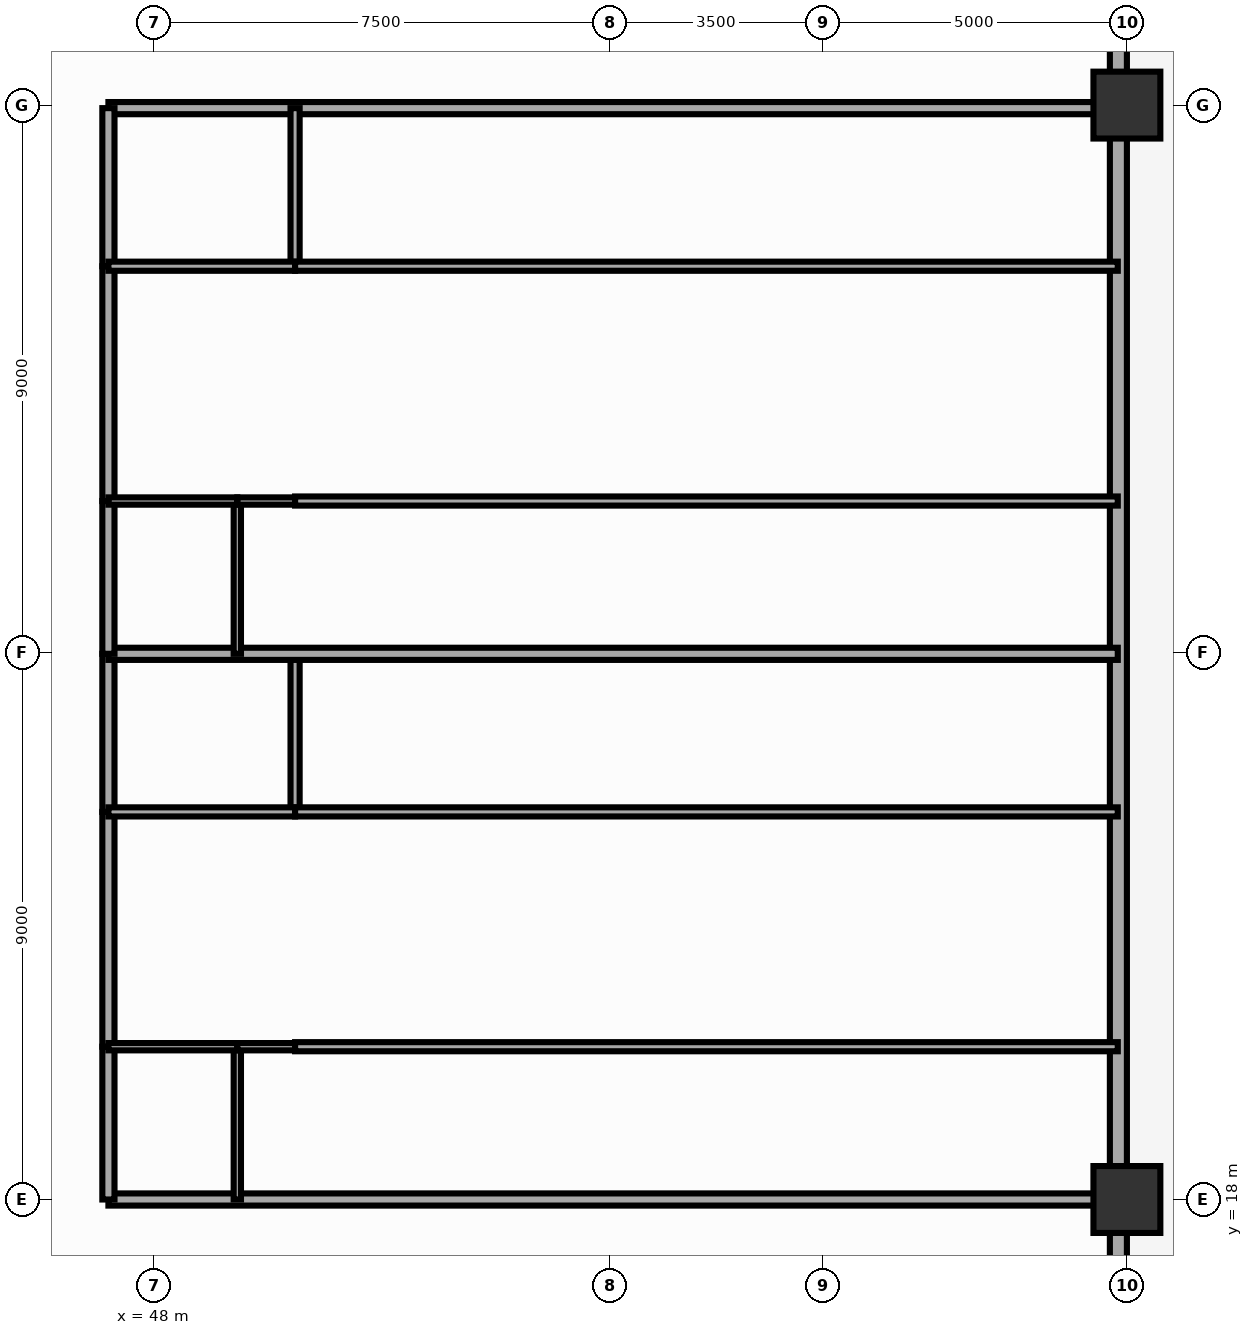
"""IFC4 building model, lengths in metres.
Left out: names, types, materials, properties, quantities, classifications, styles, units other than length and angle.
Written with IfcOpenShell. Run it as: python <this file> out.ifc"""

import sys

from ifc_helpers import new_model, si_unit, direction, frame, frame_2d, origin, origin_2d, place, context, subcontext, project, spatial, rectangle, extrude, source, transform, mapped, element, fill, save


model = new_model("IFC4")
c1 = context("Model", 3, precision=1e-05, world=origin(), true_north=direction((0.0, 1.0)))
c2 = subcontext(c1, "Body", "Model", "MODEL_VIEW")
j1 = project(units=[si_unit("LENGTHUNIT", "METRE"), si_unit("PLANEANGLEUNIT", "RADIAN")], contexts=[c1])
p1 = place(None, origin())
s1 = spatial("IfcSite", under=j1, at=p1, CompositionType="ELEMENT")
p2 = place(p1, origin())
s2 = spatial("IfcBuilding", under=s1, at=p2, CompositionType="ELEMENT")
p3 = place(p2, frame((0.0, 0.0, 19.4)))
s3 = spatial("IfcBuildingStorey", under=s2, at=p3, CompositionType="ELEMENT", Elevation=19.4)
m1 = source(origin(), c2, "Body", "SweptSolid", [
    extrude(rectangle(XDim=1.1, YDim=1.1, at=origin_2d()), origin(), (0.0, 0.0, 1.0), 3.0),
])
for number, where, z_axis, x_axis in (
    (1, (64.0, 18.0, 0.0), (0.0, 0.0, 1.0), (1.0, 0.0, 0.0)),
    (2, (64.0, 36.0, 0.0), (0.0, 0.0, 1.0), (1.0, 0.0, 0.0)),
):
    element("IfcColumn", number, at=place(p3, frame(where, z_axis=z_axis, x_axis=x_axis)), inside=s3, PredefinedType="COLUMN", context=c2, shape_type="MappedRepresentation", body=[
        mapped(m1, transform((0.0, 0.0, 0.0), scale=1.0)),
    ])
p4 = place(p3, frame((63.86, 6.5, 0.0), z_axis=(0.0, 0.0, 1.0), x_axis=(0.0, 1.0, 0.0)))
e3 = element("IfcWall", 3, at=p4, inside=s3, PredefinedType="SOLIDWALL", context=c2, shape_type="SweptSolid", body=[
    extrude(rectangle(XDim=41.0, YDim=0.28, at=frame_2d((20.5, 0.0))), origin(), (0.0, 0.0, 1.0), 2.28),
])
p5 = place(p4, frame((5.15, 0.0, 0.25)))
e4 = element("IfcOpeningElement", 4, at=p5, cuts=e3, PredefinedType="OPENING", context=c2, shape_type="SweptSolid", body=[
    extrude(rectangle(XDim=1.2, YDim=1.5, at=frame_2d((0.6, 0.75))), frame((0.0, 0.152, 0.0), z_axis=(0.0, -1.0, 0.0), x_axis=(1.0, 0.0, 0.0)), (0.0, 0.0, 1.0), 0.304),
])
p6 = place(p4, frame((12.352, 0.0, 0.25)))
e5 = element("IfcOpeningElement", 5, at=p6, cuts=e3, PredefinedType="OPENING", context=c2, shape_type="SweptSolid", body=[
    extrude(rectangle(XDim=1.2, YDim=1.5, at=frame_2d((0.6, 0.75))), frame((0.0, 0.152, 0.0), z_axis=(0.0, -1.0, 0.0), x_axis=(1.0, 0.0, 0.0)), (0.0, 0.0, 1.0), 0.304),
])
p7 = place(p4, frame((15.344, 0.0, 0.25)))
e6 = element("IfcOpeningElement", 6, at=p7, cuts=e3, PredefinedType="OPENING", context=c2, shape_type="SweptSolid", body=[
    extrude(rectangle(XDim=1.2, YDim=1.5, at=frame_2d((0.6, 0.75))), frame((0.0, 0.152, 0.0), z_axis=(0.0, -1.0, 0.0), x_axis=(1.0, 0.0, 0.0)), (0.0, 0.0, 1.0), 0.304),
])
p8 = place(p4, frame((18.575, 0.0, 0.25)))
e7 = element("IfcOpeningElement", 7, at=p8, cuts=e3, PredefinedType="OPENING", context=c2, shape_type="SweptSolid", body=[
    extrude(rectangle(XDim=1.2, YDim=1.5, at=frame_2d((0.6, 0.75))), frame((0.0, 0.152, 0.0), z_axis=(0.0, -1.0, 0.0), x_axis=(1.0, 0.0, 0.0)), (0.0, 0.0, 1.0), 0.304),
])
p9 = place(p4, frame((21.132, 0.0, 0.25)))
e8 = element("IfcOpeningElement", 8, at=p9, cuts=e3, PredefinedType="OPENING", context=c2, shape_type="SweptSolid", body=[
    extrude(rectangle(XDim=1.2, YDim=1.5, at=frame_2d((0.6, 0.75))), frame((0.0, 0.152, 0.0), z_axis=(0.0, -1.0, 0.0), x_axis=(1.0, 0.0, 0.0)), (0.0, 0.0, 1.0), 0.304),
])
p10 = place(p4, frame((24.319, 0.0, 0.25)))
e9 = element("IfcOpeningElement", 9, at=p10, cuts=e3, PredefinedType="OPENING", context=c2, shape_type="SweptSolid", body=[
    extrude(rectangle(XDim=1.2, YDim=1.5, at=frame_2d((0.6, 0.75))), frame((0.0, 0.152, 0.0), z_axis=(0.0, -1.0, 0.0), x_axis=(1.0, 0.0, 0.0)), (0.0, 0.0, 1.0), 0.304),
])
p11 = place(p4, frame((27.38, 0.0, 0.25)))
e10 = element("IfcOpeningElement", 10, at=p11, cuts=e3, PredefinedType="OPENING", context=c2, shape_type="SweptSolid", body=[
    extrude(rectangle(XDim=1.2, YDim=1.5, at=frame_2d((0.6, 0.75))), frame((0.0, 0.152, 0.0), z_axis=(0.0, -1.0, 0.0), x_axis=(1.0, 0.0, 0.0)), (0.0, 0.0, 1.0), 0.304),
])
p12 = place(p4, frame((36.05, 0.0, 0.0), z_axis=(0.0, 0.0, 1.0), x_axis=(-1.0, 0.0, 0.0)))
e11 = element("IfcOpeningElement", 11, at=p12, cuts=e3, PredefinedType="OPENING", context=c2, shape_type="SweptSolid", body=[
    extrude(rectangle(XDim=1.6, YDim=2.15, at=frame_2d((0.8, 1.075))), frame((0.0, 0.152, 0.0), z_axis=(0.0, -1.0, 0.0), x_axis=(1.0, 0.0, 0.0)), (0.0, 0.0, 1.0), 0.304),
])
for number, where, z_axis, x_axis in (
    (12, (47.25, 18.0, 0.0), (0.0, 0.0, 1.0), (1.0, 0.0, 0.0)),
    (13, (47.25, 35.95, 0.0), (0.0, 0.0, 1.0), (1.0, 0.0, 0.0)),
):
    element("IfcWall", number, at=place(p3, frame(where, z_axis=z_axis, x_axis=x_axis)), inside=s3, PredefinedType="PARTITIONING", context=c2, shape_type="SweptSolid", body=[
        extrude(rectangle(XDim=16.6, YDim=0.2, at=frame_2d((8.3, 0.0))), origin(), (0.0, 0.0, 1.0), 2.24),
    ])
p13 = place(p3, frame((47.25, 18.0, 0.0), z_axis=(0.0, 0.0, 1.0), x_axis=(0.0, 1.0, 0.0)))
e14 = element("IfcWall", 14, at=p13, inside=s3, PredefinedType="PARTITIONING", context=c2, shape_type="SweptSolid", body=[
    extrude(rectangle(XDim=2.513, YDim=0.2, at=frame_2d((1.256, 0.0))), origin(), (0.0, 0.0, 1.0), 2.79),
])
p14 = place(p3, frame((47.25, 20.513, 0.0), z_axis=(0.0, 0.0, 1.0), x_axis=(0.0, 1.0, 0.0)))
e15 = element("IfcWall", 15, at=p14, inside=s3, PredefinedType="PARTITIONING", context=c2, shape_type="SweptSolid", body=[
    extrude(rectangle(XDim=3.862, YDim=0.2, at=frame_2d((1.931, 0.0))), origin(), (0.0, 0.0, 1.0), 2.79),
])
p15 = place(p14, frame((1.431, 0.0, 0.0)))
e16 = element("IfcOpeningElement", 16, at=p15, cuts=e15, PredefinedType="OPENING", context=c2, shape_type="SweptSolid", body=[
    extrude(rectangle(XDim=1.0, YDim=2.15, at=frame_2d((0.5, 1.075))), frame((0.0, 0.112, 0.0), z_axis=(0.0, -1.0, 0.0), x_axis=(1.0, 0.0, 0.0)), (0.0, 0.0, 1.0), 0.224),
])
p16 = place(p3, frame((47.25, 24.375, 0.0), z_axis=(0.0, 0.0, 1.0), x_axis=(0.0, 1.0, 0.0)))
e17 = element("IfcWall", 17, at=p16, inside=s3, PredefinedType="PARTITIONING", context=c2, shape_type="SweptSolid", body=[
    extrude(rectangle(XDim=2.6, YDim=0.2, at=frame_2d((1.3, 0.0))), origin(), (0.0, 0.0, 1.0), 2.79),
])
p17 = place(p3, frame((49.37, 18.0, 0.0), z_axis=(0.0, 0.0, 1.0), x_axis=(0.0, 1.0, 0.0)))
e18 = element("IfcWall", 18, at=p17, inside=s3, PredefinedType="PARTITIONING", context=c2, shape_type="SweptSolid", body=[
    extrude(rectangle(XDim=2.513, YDim=0.12, at=frame_2d((1.256, 0.0))), origin(), (0.0, 0.0, 1.0), 2.79),
])
p18 = place(p3, frame((50.32, 24.375, 0.0), z_axis=(0.0, 0.0, 1.0), x_axis=(0.0, 1.0, 0.0)))
e19 = element("IfcWall", 19, at=p18, inside=s3, PredefinedType="PARTITIONING", context=c2, shape_type="SweptSolid", body=[
    extrude(rectangle(XDim=2.6, YDim=0.15, at=frame_2d((1.3, 0.0))), origin(), (0.0, 0.0, 1.0), 2.79),
])
p19 = place(p3, frame((47.25, 20.513, 0.0), z_axis=(0.0, 0.0, 1.0), x_axis=(1.0, 0.0, 0.0)))
e20 = element("IfcWall", 20, at=p19, inside=s3, PredefinedType="PARTITIONING", context=c2, shape_type="SweptSolid", body=[
    extrude(rectangle(XDim=2.12, YDim=0.12, at=frame_2d((1.06, 0.0))), origin(), (0.0, 0.0, 1.0), 2.79),
])
p20 = place(p19, frame((0.635, 0.0, 0.0)))
e21 = element("IfcOpeningElement", 21, at=p20, cuts=e20, PredefinedType="OPENING", context=c2, shape_type="SweptSolid", body=[
    extrude(rectangle(XDim=0.85, YDim=2.05, at=frame_2d((0.425, 1.025))), frame((0.0, 0.072, 0.0), z_axis=(0.0, -1.0, 0.0), x_axis=(1.0, 0.0, 0.0)), (0.0, 0.0, 1.0), 0.144),
])
p21 = place(p3, frame((49.37, 20.513, 0.0), z_axis=(0.0, 0.0, 1.0), x_axis=(1.0, 0.0, 0.0)))
e22 = element("IfcWall", 22, at=p21, inside=s3, PredefinedType="PARTITIONING", context=c2, shape_type="SweptSolid", body=[
    extrude(rectangle(XDim=0.95, YDim=0.12, at=frame_2d((0.475, 0.0))), origin(), (0.0, 0.0, 1.0), 2.79),
])
p22 = place(p3, frame((50.32, 20.513, 0.0), z_axis=(0.0, 0.0, 1.0), x_axis=(1.0, 0.0, 0.0)))
e23 = element("IfcWall", 23, at=p22, inside=s3, PredefinedType="PARTITIONING", context=c2, shape_type="SweptSolid", body=[
    extrude(rectangle(XDim=13.53, YDim=0.15, at=frame_2d((6.765, 0.0))), origin(), (0.0, 0.0, 1.0), 2.79),
])
p23 = place(p22, frame((5.809, 0.0, 0.0)))
e24 = element("IfcOpeningElement", 24, at=p23, cuts=e23, PredefinedType="OPENING", context=c2, shape_type="SweptSolid", body=[
    extrude(rectangle(XDim=0.9, YDim=2.1, at=frame_2d((0.45, 1.05))), frame((0.0, 0.087, 0.0), z_axis=(0.0, -1.0, 0.0), x_axis=(1.0, 0.0, 0.0)), (0.0, 0.0, 1.0), 0.174),
])
p24 = place(p3, frame((47.25, 24.375, 0.0), z_axis=(0.0, 0.0, 1.0), x_axis=(1.0, 0.0, 0.0)))
e25 = element("IfcWall", 25, at=p24, inside=s3, PredefinedType="PARTITIONING", context=c2, shape_type="SweptSolid", body=[
    extrude(rectangle(XDim=3.07, YDim=0.15, at=frame_2d((1.535, 0.0))), origin(), (0.0, 0.0, 1.0), 2.79),
])
p25 = place(p24, frame((1.085, 0.0, 0.0)))
e26 = element("IfcOpeningElement", 26, at=p25, cuts=e25, PredefinedType="OPENING", context=c2, shape_type="SweptSolid", body=[
    extrude(rectangle(XDim=0.9, YDim=2.1, at=frame_2d((0.45, 1.05))), frame((0.0, 0.087, 0.0), z_axis=(0.0, -1.0, 0.0), x_axis=(1.0, 0.0, 0.0)), (0.0, 0.0, 1.0), 0.174),
])
p26 = place(p3, frame((50.32, 24.375, 0.0), z_axis=(0.0, 0.0, 1.0), x_axis=(1.0, 0.0, 0.0)))
e27 = element("IfcWall", 27, at=p26, inside=s3, PredefinedType="PARTITIONING", context=c2, shape_type="SweptSolid", body=[
    extrude(rectangle(XDim=13.53, YDim=0.15, at=frame_2d((6.765, 0.0))), origin(), (0.0, 0.0, 1.0), 2.79),
])
p27 = place(p26, frame((5.809, 0.0, 0.0)))
e28 = element("IfcOpeningElement", 28, at=p27, cuts=e27, PredefinedType="OPENING", context=c2, shape_type="SweptSolid", body=[
    extrude(rectangle(XDim=0.9, YDim=2.1, at=frame_2d((0.45, 1.05))), frame((0.0, 0.087, 0.0), z_axis=(0.0, -1.0, 0.0), x_axis=(1.0, 0.0, 0.0)), (0.0, 0.0, 1.0), 0.174),
])
p28 = place(p3, frame((47.25, 26.975, 0.0), z_axis=(0.0, 0.0, 1.0), x_axis=(1.0, 0.0, 0.0)))
e29 = element("IfcWall", 29, at=p28, inside=s3, PredefinedType="PARTITIONING", context=c2, shape_type="SweptSolid", body=[
    extrude(rectangle(XDim=16.6, YDim=0.2, at=frame_2d((8.3, 0.0))), origin(), (0.0, 0.0, 1.0), 2.79),
])
p29 = place(p3, frame((47.25, 26.975, 0.0), z_axis=(0.0, 0.0, 1.0), x_axis=(0.0, 1.0, 0.0)))
e30 = element("IfcWall", 30, at=p29, inside=s3, PredefinedType="PARTITIONING", context=c2, shape_type="SweptSolid", body=[
    extrude(rectangle(XDim=2.513, YDim=0.2, at=frame_2d((1.256, 0.0))), origin(), (0.0, 0.0, 1.0), 2.79),
])
p30 = place(p3, frame((47.25, 29.488, 0.0), z_axis=(0.0, 0.0, 1.0), x_axis=(0.0, 1.0, 0.0)))
e31 = element("IfcWall", 31, at=p30, inside=s3, PredefinedType="PARTITIONING", context=c2, shape_type="SweptSolid", body=[
    extrude(rectangle(XDim=3.862, YDim=0.2, at=frame_2d((1.931, 0.0))), origin(), (0.0, 0.0, 1.0), 2.79),
])
p31 = place(p30, frame((1.431, 0.0, 0.0)))
e32 = element("IfcOpeningElement", 32, at=p31, cuts=e31, PredefinedType="OPENING", context=c2, shape_type="SweptSolid", body=[
    extrude(rectangle(XDim=1.0, YDim=2.15, at=frame_2d((0.5, 1.075))), frame((0.0, 0.112, 0.0), z_axis=(0.0, -1.0, 0.0), x_axis=(1.0, 0.0, 0.0)), (0.0, 0.0, 1.0), 0.224),
])
p32 = place(p3, frame((47.25, 33.35, 0.0), z_axis=(0.0, 0.0, 1.0), x_axis=(0.0, 1.0, 0.0)))
e33 = element("IfcWall", 33, at=p32, inside=s3, PredefinedType="PARTITIONING", context=c2, shape_type="SweptSolid", body=[
    extrude(rectangle(XDim=2.6, YDim=0.2, at=frame_2d((1.3, 0.0))), origin(), (0.0, 0.0, 1.0), 2.79),
])
p33 = place(p3, frame((49.37, 26.975, 0.0), z_axis=(0.0, 0.0, 1.0), x_axis=(0.0, 1.0, 0.0)))
e34 = element("IfcWall", 34, at=p33, inside=s3, PredefinedType="PARTITIONING", context=c2, shape_type="SweptSolid", body=[
    extrude(rectangle(XDim=2.513, YDim=0.12, at=frame_2d((1.256, 0.0))), origin(), (0.0, 0.0, 1.0), 2.79),
])
p34 = place(p3, frame((50.32, 33.35, 0.0), z_axis=(0.0, 0.0, 1.0), x_axis=(0.0, 1.0, 0.0)))
e35 = element("IfcWall", 35, at=p34, inside=s3, PredefinedType="PARTITIONING", context=c2, shape_type="SweptSolid", body=[
    extrude(rectangle(XDim=2.6, YDim=0.15, at=frame_2d((1.3, 0.0))), origin(), (0.0, 0.0, 1.0), 2.79),
])
p35 = place(p3, frame((47.25, 29.488, 0.0), z_axis=(0.0, 0.0, 1.0), x_axis=(1.0, 0.0, 0.0)))
e36 = element("IfcWall", 36, at=p35, inside=s3, PredefinedType="PARTITIONING", context=c2, shape_type="SweptSolid", body=[
    extrude(rectangle(XDim=2.12, YDim=0.12, at=frame_2d((1.06, 0.0))), origin(), (0.0, 0.0, 1.0), 2.79),
])
p36 = place(p35, frame((0.635, 0.0, 0.0)))
e37 = element("IfcOpeningElement", 37, at=p36, cuts=e36, PredefinedType="OPENING", context=c2, shape_type="SweptSolid", body=[
    extrude(rectangle(XDim=0.85, YDim=2.05, at=frame_2d((0.425, 1.025))), frame((0.0, 0.072, 0.0), z_axis=(0.0, -1.0, 0.0), x_axis=(1.0, 0.0, 0.0)), (0.0, 0.0, 1.0), 0.144),
])
p37 = place(p3, frame((49.37, 29.488, 0.0), z_axis=(0.0, 0.0, 1.0), x_axis=(1.0, 0.0, 0.0)))
e38 = element("IfcWall", 38, at=p37, inside=s3, PredefinedType="PARTITIONING", context=c2, shape_type="SweptSolid", body=[
    extrude(rectangle(XDim=0.95, YDim=0.12, at=frame_2d((0.475, 0.0))), origin(), (0.0, 0.0, 1.0), 2.79),
])
p38 = place(p3, frame((50.32, 29.488, 0.0), z_axis=(0.0, 0.0, 1.0), x_axis=(1.0, 0.0, 0.0)))
e39 = element("IfcWall", 39, at=p38, inside=s3, PredefinedType="PARTITIONING", context=c2, shape_type="SweptSolid", body=[
    extrude(rectangle(XDim=13.53, YDim=0.15, at=frame_2d((6.765, 0.0))), origin(), (0.0, 0.0, 1.0), 2.79),
])
p39 = place(p38, frame((5.809, 0.0, 0.0)))
e40 = element("IfcOpeningElement", 40, at=p39, cuts=e39, PredefinedType="OPENING", context=c2, shape_type="SweptSolid", body=[
    extrude(rectangle(XDim=0.9, YDim=2.1, at=frame_2d((0.45, 1.05))), frame((0.0, 0.087, 0.0), z_axis=(0.0, -1.0, 0.0), x_axis=(1.0, 0.0, 0.0)), (0.0, 0.0, 1.0), 0.174),
])
p40 = place(p3, frame((47.25, 33.35, 0.0), z_axis=(0.0, 0.0, 1.0), x_axis=(1.0, 0.0, 0.0)))
e41 = element("IfcWall", 41, at=p40, inside=s3, PredefinedType="PARTITIONING", context=c2, shape_type="SweptSolid", body=[
    extrude(rectangle(XDim=3.07, YDim=0.15, at=frame_2d((1.535, 0.0))), origin(), (0.0, 0.0, 1.0), 2.79),
])
p41 = place(p40, frame((1.085, 0.0, 0.0)))
e42 = element("IfcOpeningElement", 42, at=p41, cuts=e41, PredefinedType="OPENING", context=c2, shape_type="SweptSolid", body=[
    extrude(rectangle(XDim=0.9, YDim=2.1, at=frame_2d((0.45, 1.05))), frame((0.0, 0.087, 0.0), z_axis=(0.0, -1.0, 0.0), x_axis=(1.0, 0.0, 0.0)), (0.0, 0.0, 1.0), 0.174),
])
p42 = place(p3, frame((50.32, 33.35, 0.0), z_axis=(0.0, 0.0, 1.0), x_axis=(1.0, 0.0, 0.0)))
e43 = element("IfcWall", 43, at=p42, inside=s3, PredefinedType="PARTITIONING", context=c2, shape_type="SweptSolid", body=[
    extrude(rectangle(XDim=13.53, YDim=0.15, at=frame_2d((6.765, 0.0))), origin(), (0.0, 0.0, 1.0), 2.79),
])
p43 = place(p42, frame((5.809, 0.0, 0.0)))
e44 = element("IfcOpeningElement", 44, at=p43, cuts=e43, PredefinedType="OPENING", context=c2, shape_type="SweptSolid", body=[
    extrude(rectangle(XDim=0.9, YDim=2.1, at=frame_2d((0.45, 1.05))), frame((0.0, 0.087, 0.0), z_axis=(0.0, -1.0, 0.0), x_axis=(1.0, 0.0, 0.0)), (0.0, 0.0, 1.0), 0.174),
])
m2 = source(origin(), c2, "Body", "SweptSolid", [
    extrude(rectangle(XDim=1.2, YDim=1.5, at=frame_2d((0.6, 0.75))), frame((0.0, 0.03, 0.0), z_axis=(0.0, -1.0, 0.0), x_axis=(1.0, 0.0, 0.0)), (0.0, 0.0, 1.0), 0.06),
])
p44 = place(p6, origin())
e45 = element("IfcWindow", 45, at=p44, inside=s3, PartitioningType="SINGLE_PANEL", PredefinedType="WINDOW", context=c2, shape_type="MappedRepresentation", body=[
    mapped(m2, transform((0.0, 0.0, 0.0), scale=1.0)),
])
fill(e5, e45)
p45 = place(p7, origin())
e46 = element("IfcWindow", 46, at=p45, inside=s3, PartitioningType="SINGLE_PANEL", PredefinedType="WINDOW", context=c2, shape_type="MappedRepresentation", body=[
    mapped(m2, transform((0.0, 0.0, 0.0), scale=1.0)),
])
fill(e6, e46)
p46 = place(p8, origin())
e47 = element("IfcWindow", 47, at=p46, inside=s3, PartitioningType="SINGLE_PANEL", PredefinedType="WINDOW", context=c2, shape_type="MappedRepresentation", body=[
    mapped(m2, transform((0.0, 0.0, 0.0), scale=1.0)),
])
fill(e7, e47)
p47 = place(p9, origin())
e48 = element("IfcWindow", 48, at=p47, inside=s3, PartitioningType="SINGLE_PANEL", PredefinedType="WINDOW", context=c2, shape_type="MappedRepresentation", body=[
    mapped(m2, transform((0.0, 0.0, 0.0), scale=1.0)),
])
fill(e8, e48)
p48 = place(p10, origin())
e49 = element("IfcWindow", 49, at=p48, inside=s3, PartitioningType="SINGLE_PANEL", PredefinedType="WINDOW", context=c2, shape_type="MappedRepresentation", body=[
    mapped(m2, transform((0.0, 0.0, 0.0), scale=1.0)),
])
fill(e9, e49)
p49 = place(p11, origin())
e50 = element("IfcWindow", 50, at=p49, inside=s3, PartitioningType="SINGLE_PANEL", PredefinedType="WINDOW", context=c2, shape_type="MappedRepresentation", body=[
    mapped(m2, transform((0.0, 0.0, 0.0), scale=1.0)),
])
fill(e10, e50)
m3 = source(origin(), c2, "Body", "SweptSolid", [
    extrude(rectangle(XDim=1.0, YDim=2.15, at=frame_2d((0.5, 1.075))), frame((0.0, 0.025, 0.0), z_axis=(0.0, -1.0, 0.0), x_axis=(1.0, 0.0, 0.0)), (0.0, 0.0, 1.0), 0.05),
])
p50 = place(p15, origin())
e51 = element("IfcDoor", 51, at=p50, inside=s3, OperationType="SINGLE_SWING_RIGHT", PredefinedType="DOOR", context=c2, shape_type="MappedRepresentation", body=[
    mapped(m3, transform((0.0, 0.0, 0.0), scale=1.0)),
])
fill(e16, e51)
m4 = source(origin(), c2, "Body", "SweptSolid", [
    extrude(rectangle(XDim=0.85, YDim=2.05, at=frame_2d((0.425, 1.025))), frame((0.0, 0.025, 0.0), z_axis=(0.0, -1.0, 0.0), x_axis=(1.0, 0.0, 0.0)), (0.0, 0.0, 1.0), 0.05),
])
p51 = place(p20, origin())
e52 = element("IfcDoor", 52, at=p51, inside=s3, OperationType="SINGLE_SWING_LEFT", PredefinedType="DOOR", context=c2, shape_type="MappedRepresentation", body=[
    mapped(m4, transform((0.0, 0.0, 0.0), scale=1.0)),
])
fill(e21, e52)
m5 = source(origin(), c2, "Body", "SweptSolid", [
    extrude(rectangle(XDim=0.9, YDim=2.1, at=frame_2d((0.45, 1.05))), frame((0.0, 0.025, 0.0), z_axis=(0.0, -1.0, 0.0), x_axis=(1.0, 0.0, 0.0)), (0.0, 0.0, 1.0), 0.05),
])
p52 = place(p23, origin())
e53 = element("IfcDoor", 53, at=p52, inside=s3, OperationType="SINGLE_SWING_RIGHT", PredefinedType="DOOR", context=c2, shape_type="MappedRepresentation", body=[
    mapped(m5, transform((0.0, 0.0, 0.0), scale=1.0)),
])
fill(e24, e53)
p53 = place(p25, origin())
e54 = element("IfcDoor", 54, at=p53, inside=s3, OperationType="SINGLE_SWING_LEFT", PredefinedType="DOOR", context=c2, shape_type="MappedRepresentation", body=[
    mapped(m5, transform((0.0, 0.0, 0.0), scale=1.0)),
])
fill(e26, e54)
p54 = place(p27, origin())
e55 = element("IfcDoor", 55, at=p54, inside=s3, OperationType="SINGLE_SWING_RIGHT", PredefinedType="DOOR", context=c2, shape_type="MappedRepresentation", body=[
    mapped(m5, transform((0.0, 0.0, 0.0), scale=1.0)),
])
fill(e28, e55)
p55 = place(p31, origin())
e56 = element("IfcDoor", 56, at=p55, inside=s3, OperationType="SINGLE_SWING_LEFT", PredefinedType="DOOR", context=c2, shape_type="MappedRepresentation", body=[
    mapped(m3, transform((0.0, 0.0, 0.0), scale=1.0)),
])
fill(e32, e56)
p56 = place(p36, origin())
e57 = element("IfcDoor", 57, at=p56, inside=s3, OperationType="SINGLE_SWING_RIGHT", PredefinedType="DOOR", context=c2, shape_type="MappedRepresentation", body=[
    mapped(m4, transform((0.0, 0.0, 0.0), scale=1.0)),
])
fill(e37, e57)
p57 = place(p39, origin())
e58 = element("IfcDoor", 58, at=p57, inside=s3, OperationType="SINGLE_SWING_LEFT", PredefinedType="DOOR", context=c2, shape_type="MappedRepresentation", body=[
    mapped(m5, transform((0.0, 0.0, 0.0), scale=1.0)),
])
fill(e40, e58)
p58 = place(p41, origin())
e59 = element("IfcDoor", 59, at=p58, inside=s3, OperationType="SINGLE_SWING_RIGHT", PredefinedType="DOOR", context=c2, shape_type="MappedRepresentation", body=[
    mapped(m5, transform((0.0, 0.0, 0.0), scale=1.0)),
])
fill(e42, e59)
p59 = place(p43, origin())
e60 = element("IfcDoor", 60, at=p59, inside=s3, OperationType="SINGLE_SWING_LEFT", PredefinedType="DOOR", context=c2, shape_type="MappedRepresentation", body=[
    mapped(m5, transform((0.0, 0.0, 0.0), scale=1.0)),
])
fill(e44, e60)
save(model, sys.argv[1])
